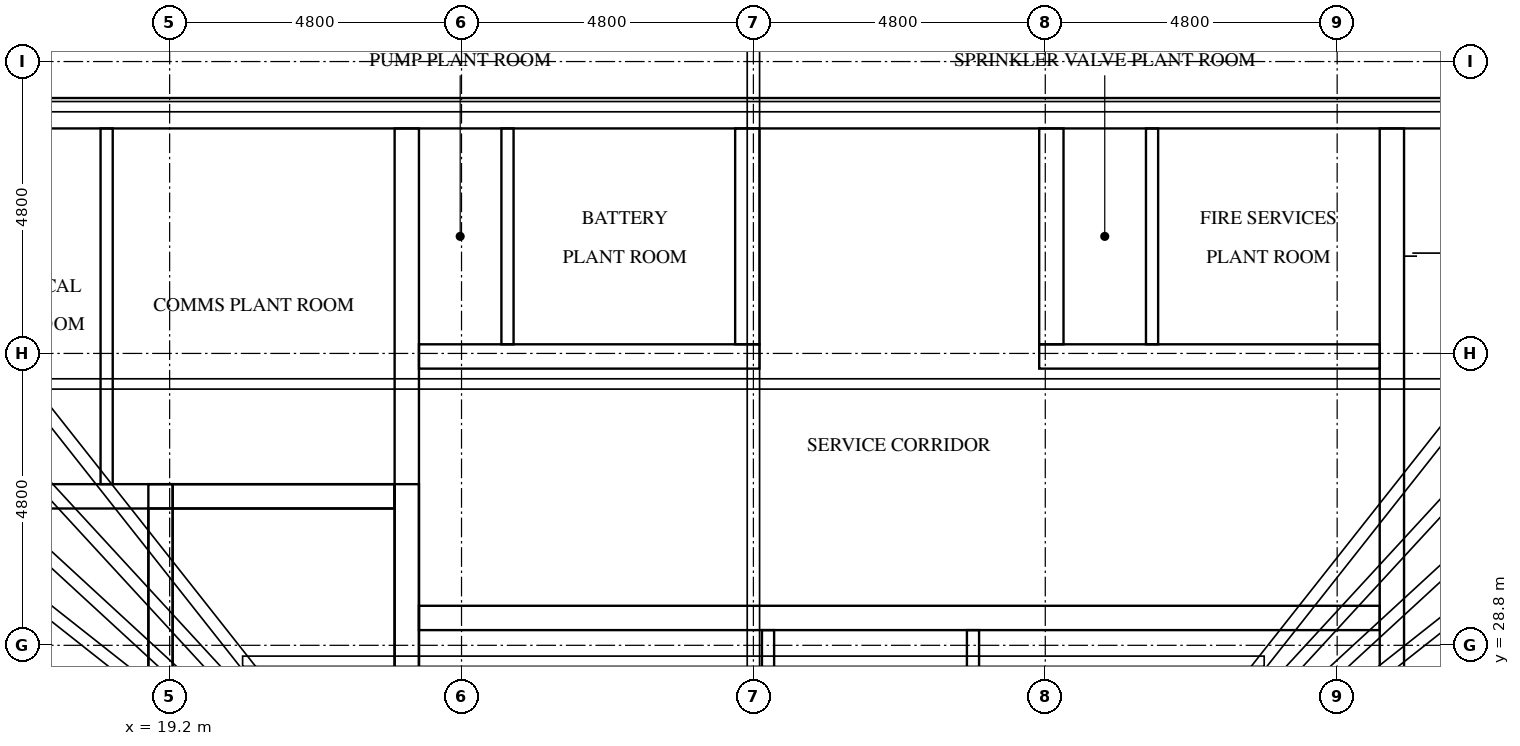
"""IFC4 building model, lengths in metres.
Left out: names, types, materials, properties, quantities, classifications, styles, units other than length and angle.
Written with IfcOpenShell. Run it as: python <this file> out.ifc"""

import sys

from ifc_helpers import new_model, si_unit, direction, frame, frame_2d, origin, place, context, subcontext, project, spatial, rectangle, extrude, element, fill, save


model = new_model("IFC4")
c1 = context("Model", 3, precision=1e-05, world=origin(), true_north=direction((0.0, 1.0)))
c2 = subcontext(c1, "Body", "Model", "MODEL_VIEW")
j1 = project(units=[si_unit("LENGTHUNIT", "METRE"), si_unit("PLANEANGLEUNIT", "RADIAN")], contexts=[c1])
p1 = place(None, origin())
s1 = spatial("IfcSite", under=j1, at=p1, CompositionType="ELEMENT")
p2 = place(p1, origin())
s2 = spatial("IfcBuilding", under=s1, at=p2, CompositionType="ELEMENT")
p3 = place(p2, frame((0.0, 0.0, 317.3)))
s3 = spatial("IfcBuildingStorey", under=s2, at=p3, CompositionType="ELEMENT", Elevation=317.3)
p4 = place(p3, frame((15.0, 37.55, 0.0), z_axis=(0.0, 0.0, 1.0), x_axis=(1.0, 0.0, 0.0)))
e1 = element("IfcWall", 1, at=p4, inside=s3, PredefinedType="SHEAR", context=c2, shape_type="SweptSolid", body=[
    extrude(rectangle(XDim=32.4, YDim=0.5, at=frame_2d((16.2, 0.0))), origin(), (0.0, 0.0, 1.0), 3.0),
])
p5 = place(p4, frame((15.3, 0.0, 0.0)))
e2 = element("IfcOpeningElement", 2, at=p5, cuts=e1, PredefinedType="OPENING", context=c2, shape_type="SweptSolid", body=[
    extrude(rectangle(XDim=1.8, YDim=2.1, at=frame_2d((0.9, 1.05))), frame((0.0, 0.26, 0.0), z_axis=(0.0, -1.0, 0.0), x_axis=(1.0, 0.0, 0.0)), (0.0, 0.0, 1.0), 0.52),
])
p6 = place(p4, frame((1.282, 0.0, 0.0)))
e3 = element("IfcOpeningElement", 3, at=p6, cuts=e1, PredefinedType="OPENING", context=c2, shape_type="SweptSolid", body=[
    extrude(rectangle(XDim=1.0, YDim=2.1, at=frame_2d((0.5, 1.05))), frame((0.0, 0.26, 0.0), z_axis=(0.0, -1.0, 0.0), x_axis=(1.0, 0.0, 0.0)), (0.0, 0.0, 1.0), 0.52),
])
p7 = place(p4, frame((5.082, 0.0, 0.0)))
e4 = element("IfcOpeningElement", 4, at=p7, cuts=e1, PredefinedType="OPENING", context=c2, shape_type="SweptSolid", body=[
    extrude(rectangle(XDim=1.0, YDim=2.1, at=frame_2d((0.5, 1.05))), frame((0.0, 0.26, 0.0), z_axis=(0.0, -1.0, 0.0), x_axis=(1.0, 0.0, 0.0)), (0.0, 0.0, 1.0), 0.52),
])
p8 = place(p3, frame((19.05, 15.5, 0.0), z_axis=(0.0, 0.0, 1.0), x_axis=(0.0, 1.0, 0.0)))
e5 = element("IfcWall", 5, at=p8, inside=s3, PredefinedType="SHEAR", context=c2, shape_type="SweptSolid", body=[
    extrude(rectangle(XDim=15.55, YDim=0.4, at=frame_2d((7.775, 0.0))), origin(), (0.0, 0.0, 1.0), 3.0),
])
p9 = place(p8, frame((9.95, 0.0, 0.0)))
e6 = element("IfcOpeningElement", 6, at=p9, cuts=e5, PredefinedType="OPENING", context=c2, shape_type="SweptSolid", body=[
    extrude(rectangle(XDim=1.1, YDim=2.1, at=frame_2d((0.55, 1.05))), frame((0.0, 0.21, 0.0), z_axis=(0.0, -1.0, 0.0), x_axis=(1.0, 0.0, 0.0)), (0.0, 0.0, 1.0), 0.42),
])
p10 = place(p8, frame((13.45, 0.0, 0.0)))
e7 = element("IfcOpeningElement", 7, at=p10, cuts=e5, PredefinedType="OPENING", context=c2, shape_type="SweptSolid", body=[
    extrude(rectangle(XDim=1.1, YDim=2.1, at=frame_2d((0.55, 1.05))), frame((0.0, 0.21, 0.0), z_axis=(0.0, -1.0, 0.0), x_axis=(1.0, 0.0, 0.0)), (0.0, 0.0, 1.0), 0.42),
])
p11 = place(p8, frame((0.7, 0.0, 0.0)))
e8 = element("IfcOpeningElement", 8, at=p11, cuts=e5, PredefinedType="OPENING", context=c2, shape_type="SweptSolid", body=[
    extrude(rectangle(XDim=1.2, YDim=2.1, at=frame_2d((0.6, 1.05))), frame((0.0, 0.21, 0.0), z_axis=(0.0, -1.0, 0.0), x_axis=(1.0, 0.0, 0.0)), (0.0, 0.0, 1.0), 0.42),
])
p12 = place(p3, frame((23.1, 15.5, 0.0), z_axis=(0.0, 0.0, 1.0), x_axis=(0.0, 1.0, 0.0)))
e9 = element("IfcWall", 9, at=p12, inside=s3, PredefinedType="SHEAR", context=c2, shape_type="SweptSolid", body=[
    extrude(rectangle(XDim=21.8, YDim=0.4, at=frame_2d((10.9, 0.0))), origin(), (0.0, 0.0, 1.0), 3.0),
])
p13 = place(p3, frame((39.3, 27.75, 0.0), z_axis=(0.0, 0.0, 1.0), x_axis=(0.0, 1.0, 0.0)))
e10 = element("IfcWall", 10, at=p13, inside=s3, PredefinedType="SHEAR", context=c2, shape_type="SweptSolid", body=[
    extrude(rectangle(XDim=9.55, YDim=0.4, at=frame_2d((4.775, 0.0))), origin(), (0.0, 0.0, 1.0), 3.0),
])
p14 = place(p3, frame((15.5, 31.25, 0.0), z_axis=(0.0, 0.0, 1.0), x_axis=(1.0, 0.0, 0.0)))
e11 = element("IfcWall", 11, at=p14, inside=s3, PredefinedType="SHEAR", context=c2, shape_type="SweptSolid", body=[
    extrude(rectangle(XDim=7.4, YDim=0.4, at=frame_2d((3.7, 0.0))), origin(), (0.0, 0.0, 1.0), 3.0),
])
p15 = place(p3, frame((23.3, 29.25, 0.0), z_axis=(0.0, 0.0, 1.0), x_axis=(1.0, 0.0, 0.0)))
e12 = element("IfcWall", 12, at=p15, inside=s3, PredefinedType="SHEAR", context=c2, shape_type="SweptSolid", body=[
    extrude(rectangle(XDim=15.8, YDim=0.4, at=frame_2d((7.9, 0.0))), origin(), (0.0, 0.0, 1.0), 3.0),
])
p16 = place(p15, frame((2.32, 0.0, 0.0)))
e13 = element("IfcOpeningElement", 13, at=p16, cuts=e12, PredefinedType="OPENING", context=c2, shape_type="SweptSolid", body=[
    extrude(rectangle(XDim=1.0, YDim=2.1, at=frame_2d((0.5, 1.05))), frame((0.0, 0.21, 0.0), z_axis=(0.0, -1.0, 0.0), x_axis=(1.0, 0.0, 0.0)), (0.0, 0.0, 1.0), 0.42),
])
p17 = place(p15, frame((6.926, 0.0, 0.0)))
e14 = element("IfcOpeningElement", 14, at=p17, cuts=e12, PredefinedType="OPENING", context=c2, shape_type="SweptSolid", body=[
    extrude(rectangle(XDim=1.0, YDim=2.1, at=frame_2d((0.5, 1.05))), frame((0.0, 0.21, 0.0), z_axis=(0.0, -1.0, 0.0), x_axis=(1.0, 0.0, 0.0)), (0.0, 0.0, 1.0), 0.42),
])
p18 = place(p15, frame((12.006, 0.0, 0.0)))
e15 = element("IfcOpeningElement", 15, at=p18, cuts=e12, PredefinedType="OPENING", context=c2, shape_type="SweptSolid", body=[
    extrude(rectangle(XDim=1.0, YDim=2.1, at=frame_2d((0.5, 1.05))), frame((0.0, 0.21, 0.0), z_axis=(0.0, -1.0, 0.0), x_axis=(1.0, 0.0, 0.0)), (0.0, 0.0, 1.0), 0.42),
])
p19 = place(p3, frame((23.3, 33.55, 0.0), z_axis=(0.0, 0.0, 1.0), x_axis=(1.0, 0.0, 0.0)))
e16 = element("IfcWall", 16, at=p19, inside=s3, PredefinedType="SHEAR", context=c2, shape_type="SweptSolid", body=[
    extrude(rectangle(XDim=5.6, YDim=0.4, at=frame_2d((2.8, 0.0))), origin(), (0.0, 0.0, 1.0), 3.0),
])
p20 = place(p19, frame((0.178, 0.0, 0.0)))
e17 = element("IfcOpeningElement", 17, at=p20, cuts=e16, PredefinedType="OPENING", context=c2, shape_type="SweptSolid", body=[
    extrude(rectangle(XDim=1.0, YDim=2.1, at=frame_2d((0.5, 1.05))), frame((0.0, 0.21, 0.0), z_axis=(0.0, -1.0, 0.0), x_axis=(1.0, 0.0, 0.0)), (0.0, 0.0, 1.0), 0.42),
])
p21 = place(p19, frame((2.878, 0.0, 0.0)))
e18 = element("IfcOpeningElement", 18, at=p21, cuts=e16, PredefinedType="OPENING", context=c2, shape_type="SweptSolid", body=[
    extrude(rectangle(XDim=1.0, YDim=2.1, at=frame_2d((0.5, 1.05))), frame((0.0, 0.21, 0.0), z_axis=(0.0, -1.0, 0.0), x_axis=(1.0, 0.0, 0.0)), (0.0, 0.0, 1.0), 0.42),
])
p22 = place(p3, frame((33.5, 33.55, 0.0), z_axis=(0.0, 0.0, 1.0), x_axis=(1.0, 0.0, 0.0)))
e19 = element("IfcWall", 19, at=p22, inside=s3, PredefinedType="SHEAR", context=c2, shape_type="SweptSolid", body=[
    extrude(rectangle(XDim=5.6, YDim=0.4, at=frame_2d((2.8, 0.0))), origin(), (0.0, 0.0, 1.0), 3.0),
])
p23 = place(p22, frame((0.578, 0.0, 0.0)))
e20 = element("IfcOpeningElement", 20, at=p23, cuts=e19, PredefinedType="OPENING", context=c2, shape_type="SweptSolid", body=[
    extrude(rectangle(XDim=1.0, YDim=2.1, at=frame_2d((0.5, 1.05))), frame((0.0, 0.21, 0.0), z_axis=(0.0, -1.0, 0.0), x_axis=(1.0, 0.0, 0.0)), (0.0, 0.0, 1.0), 0.42),
])
p24 = place(p22, frame((3.278, 0.0, 0.0)))
e21 = element("IfcOpeningElement", 21, at=p24, cuts=e19, PredefinedType="OPENING", context=c2, shape_type="SweptSolid", body=[
    extrude(rectangle(XDim=1.0, YDim=2.1, at=frame_2d((0.5, 1.05))), frame((0.0, 0.21, 0.0), z_axis=(0.0, -1.0, 0.0), x_axis=(1.0, 0.0, 0.0)), (0.0, 0.0, 1.0), 0.42),
])
for number, where, z_axis, x_axis in (
    (22, (28.7, 33.75, 0.0), (0.0, 0.0, 1.0), (0.0, 1.0, 0.0)),
    (23, (33.7, 33.75, 0.0), (0.0, 0.0, 1.0), (0.0, 1.0, 0.0)),
):
    element("IfcWall", number, at=place(p3, frame(where, z_axis=z_axis, x_axis=x_axis)), inside=s3, PredefinedType="SHEAR", context=c2, shape_type="SweptSolid", body=[
        extrude(rectangle(XDim=3.55, YDim=0.4, at=frame_2d((1.775, 0.0))), origin(), (0.0, 0.0, 1.0), 3.0),
    ])
for number, where, z_axis, x_axis in (
    (24, (19.05, 24.05, 3.0), (0.0, 0.0, 1.0), (0.0, 1.0, 0.0)),
    (25, (23.1, 24.05, 3.0), (0.0, 0.0, 1.0), (0.0, 1.0, 0.0)),
):
    element("IfcWall", number, at=place(p3, frame(where, z_axis=z_axis, x_axis=x_axis)), inside=s3, PredefinedType="SHEAR", context=c2, shape_type="SweptSolid", body=[
        extrude(rectangle(XDim=7.4, YDim=0.4, at=frame_2d((3.7, 0.0))), origin(), (0.0, 0.0, 1.0), 1.5),
    ])
p25 = place(p3, frame((19.25, 31.25, 3.0), z_axis=(0.0, 0.0, 1.0), x_axis=(1.0, 0.0, 0.0)))
e26 = element("IfcWall", 26, at=p25, inside=s3, PredefinedType="SHEAR", context=c2, shape_type="SweptSolid", body=[
    extrude(rectangle(XDim=3.65, YDim=0.4, at=frame_2d((1.825, 0.0))), origin(), (0.0, 0.0, 1.0), 1.5),
])
p26 = place(p3, frame((18.164, 31.45, 0.0), z_axis=(0.0, 0.0, 1.0), x_axis=(0.0, 1.0, 0.0)))
e27 = element("IfcWall", 27, at=p26, inside=s3, PredefinedType="PARTITIONING", context=c2, shape_type="SweptSolid", body=[
    extrude(rectangle(XDim=5.85, YDim=0.2, at=frame_2d((2.925, 0.0))), origin(), (0.0, 0.0, 1.0), 3.0),
])
for number, where, z_axis, x_axis in (
    (28, (29.041, 26.35, 0.0), (0.0, 0.0, 1.0), (0.0, 1.0, 0.0)),
    (29, (32.411, 26.35, 0.0), (0.0, 0.0, 1.0), (0.0, 1.0, 0.0)),
):
    element("IfcWall", number, at=place(p3, frame(where, z_axis=z_axis, x_axis=x_axis)), inside=s3, PredefinedType="PARTITIONING", context=c2, shape_type="SweptSolid", body=[
        extrude(rectangle(XDim=2.7, YDim=0.2, at=frame_2d((1.35, 0.0))), origin(), (0.0, 0.0, 1.0), 3.0),
    ])
for number, where, z_axis, x_axis in (
    (30, (24.756, 33.75, 0.0), (0.0, 0.0, 1.0), (0.0, 1.0, 0.0)),
    (31, (35.356, 33.75, 0.0), (0.0, 0.0, 1.0), (0.0, 1.0, 0.0)),
):
    element("IfcWall", number, at=place(p3, frame(where, z_axis=z_axis, x_axis=x_axis)), inside=s3, PredefinedType="PARTITIONING", context=c2, shape_type="SweptSolid", body=[
        extrude(rectangle(XDim=3.55, YDim=0.2, at=frame_2d((1.775, 0.0))), origin(), (0.0, 0.0, 1.0), 3.0),
    ])
p27 = place(p10, origin())
e32 = element("IfcDoor", 32, at=p27, inside=s3, OperationType="DOUBLE_DOOR_SLIDING", PredefinedType="DOOR", context=c2, shape_type="SweptSolid", body=[
    extrude(rectangle(XDim=1.1, YDim=2.1, at=frame_2d((0.55, 1.05))), frame((0.0, 0.025, 0.0), z_axis=(0.0, -1.0, 0.0), x_axis=(1.0, 0.0, 0.0)), (0.0, 0.0, 1.0), 0.05),
])
fill(e7, e32)
p28 = place(p5, origin())
e33 = element("IfcDoor", 33, at=p28, inside=s3, OperationType="DOUBLE_DOOR_SINGLE_SWING", PredefinedType="DOOR", context=c2, shape_type="SweptSolid", body=[
    extrude(rectangle(XDim=1.8, YDim=2.1, at=frame_2d((0.9, 1.05))), frame((0.0, 0.025, 0.0), z_axis=(0.0, -1.0, 0.0), x_axis=(1.0, 0.0, 0.0)), (0.0, 0.0, 1.0), 0.05),
])
fill(e2, e33)
p29 = place(p6, origin())
e34 = element("IfcDoor", 34, at=p29, inside=s3, OperationType="SINGLE_SWING_LEFT", PredefinedType="DOOR", context=c2, shape_type="SweptSolid", body=[
    extrude(rectangle(XDim=1.0, YDim=2.1, at=frame_2d((0.5, 1.05))), frame((0.0, 0.025, 0.0), z_axis=(0.0, -1.0, 0.0), x_axis=(1.0, 0.0, 0.0)), (0.0, 0.0, 1.0), 0.05),
])
fill(e3, e34)
p30 = place(p7, origin())
e35 = element("IfcDoor", 35, at=p30, inside=s3, OperationType="SINGLE_SWING_RIGHT", PredefinedType="DOOR", context=c2, shape_type="SweptSolid", body=[
    extrude(rectangle(XDim=1.0, YDim=2.1, at=frame_2d((0.5, 1.05))), frame((0.0, 0.025, 0.0), z_axis=(0.0, -1.0, 0.0), x_axis=(1.0, 0.0, 0.0)), (0.0, 0.0, 1.0), 0.05),
])
fill(e4, e35)
p31 = place(p16, origin())
e36 = element("IfcDoor", 36, at=p31, inside=s3, OperationType="SINGLE_SWING_RIGHT", PredefinedType="DOOR", context=c2, shape_type="SweptSolid", body=[
    extrude(rectangle(XDim=1.0, YDim=2.1, at=frame_2d((0.5, 1.05))), frame((0.0, 0.025, 0.0), z_axis=(0.0, -1.0, 0.0), x_axis=(1.0, 0.0, 0.0)), (0.0, 0.0, 1.0), 0.05),
])
fill(e13, e36)
p32 = place(p17, origin())
e37 = element("IfcDoor", 37, at=p32, inside=s3, OperationType="SINGLE_SWING_LEFT", PredefinedType="DOOR", context=c2, shape_type="SweptSolid", body=[
    extrude(rectangle(XDim=1.0, YDim=2.1, at=frame_2d((0.5, 1.05))), frame((0.0, 0.025, 0.0), z_axis=(0.0, -1.0, 0.0), x_axis=(1.0, 0.0, 0.0)), (0.0, 0.0, 1.0), 0.05),
])
fill(e14, e37)
p33 = place(p18, origin())
e38 = element("IfcDoor", 38, at=p33, inside=s3, OperationType="SINGLE_SWING_RIGHT", PredefinedType="DOOR", context=c2, shape_type="SweptSolid", body=[
    extrude(rectangle(XDim=1.0, YDim=2.1, at=frame_2d((0.5, 1.05))), frame((0.0, 0.025, 0.0), z_axis=(0.0, -1.0, 0.0), x_axis=(1.0, 0.0, 0.0)), (0.0, 0.0, 1.0), 0.05),
])
fill(e15, e38)
p34 = place(p20, frame((1.0, 0.0, 0.0), z_axis=(0.0, 0.0, 1.0), x_axis=(-1.0, 0.0, 0.0)))
e39 = element("IfcDoor", 39, at=p34, inside=s3, OperationType="SINGLE_SWING_LEFT", PredefinedType="DOOR", context=c2, shape_type="SweptSolid", body=[
    extrude(rectangle(XDim=1.0, YDim=2.1, at=frame_2d((0.5, 1.05))), frame((0.0, 0.025, 0.0), z_axis=(0.0, -1.0, 0.0), x_axis=(1.0, 0.0, 0.0)), (0.0, 0.0, 1.0), 0.05),
])
fill(e17, e39)
p35 = place(p21, frame((1.0, 0.0, 0.0), z_axis=(0.0, 0.0, 1.0), x_axis=(-1.0, 0.0, 0.0)))
e40 = element("IfcDoor", 40, at=p35, inside=s3, OperationType="SINGLE_SWING_RIGHT", PredefinedType="DOOR", context=c2, shape_type="SweptSolid", body=[
    extrude(rectangle(XDim=1.0, YDim=2.1, at=frame_2d((0.5, 1.05))), frame((0.0, 0.025, 0.0), z_axis=(0.0, -1.0, 0.0), x_axis=(1.0, 0.0, 0.0)), (0.0, 0.0, 1.0), 0.05),
])
fill(e18, e40)
p36 = place(p23, frame((1.0, 0.0, 0.0), z_axis=(0.0, 0.0, 1.0), x_axis=(-1.0, 0.0, 0.0)))
e41 = element("IfcDoor", 41, at=p36, inside=s3, OperationType="SINGLE_SWING_LEFT", PredefinedType="DOOR", context=c2, shape_type="SweptSolid", body=[
    extrude(rectangle(XDim=1.0, YDim=2.1, at=frame_2d((0.5, 1.05))), frame((0.0, 0.025, 0.0), z_axis=(0.0, -1.0, 0.0), x_axis=(1.0, 0.0, 0.0)), (0.0, 0.0, 1.0), 0.05),
])
fill(e20, e41)
p37 = place(p24, frame((1.0, 0.0, 0.0), z_axis=(0.0, 0.0, 1.0), x_axis=(-1.0, 0.0, 0.0)))
e42 = element("IfcDoor", 42, at=p37, inside=s3, OperationType="SINGLE_SWING_RIGHT", PredefinedType="DOOR", context=c2, shape_type="SweptSolid", body=[
    extrude(rectangle(XDim=1.0, YDim=2.1, at=frame_2d((0.5, 1.05))), frame((0.0, 0.025, 0.0), z_axis=(0.0, -1.0, 0.0), x_axis=(1.0, 0.0, 0.0)), (0.0, 0.0, 1.0), 0.05),
])
fill(e21, e42)
save(model, sys.argv[1])
